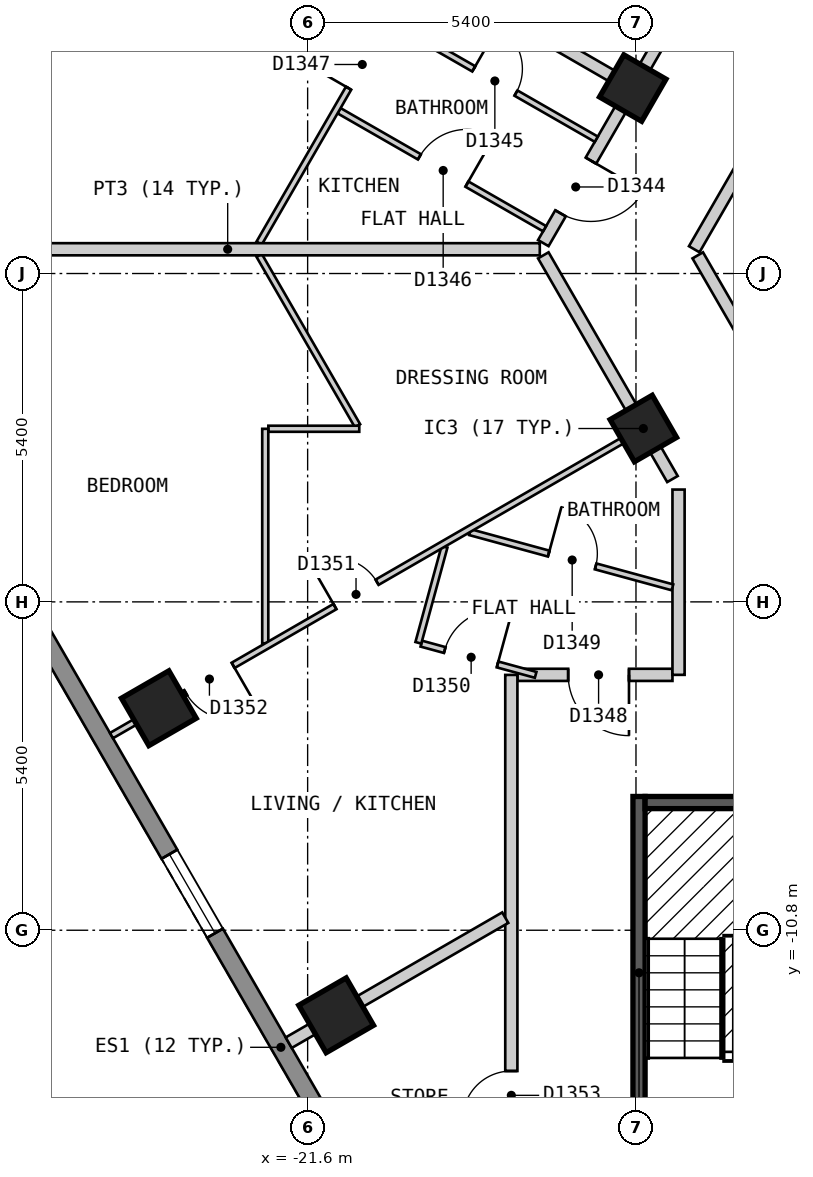
"""IFC4 building model, lengths in metres.
Left out: names, types, materials, properties, quantities, classifications, styles, units other than length and angle.
Written with IfcOpenShell. Run it as: python <this file> out.ifc"""

import sys

from ifc_helpers import new_model, si_unit, direction, frame, frame_2d, origin, origin_2d, place, context, subcontext, project, spatial, polyline, rectangle, outline, extrude, element, fill, save


model = new_model("IFC4")
c1 = context("Model", 3, precision=1e-05, world=origin(), true_north=direction((0.0, 1.0)))
c2 = subcontext(c1, "Body", "Model", "MODEL_VIEW")
j1 = project(units=[si_unit("LENGTHUNIT", "METRE"), si_unit("PLANEANGLEUNIT", "RADIAN")], contexts=[c1])
p1 = place(None, origin())
s1 = spatial("IfcSite", under=j1, at=p1, CompositionType="ELEMENT")
p2 = place(p1, origin())
s2 = spatial("IfcBuilding", under=s1, at=p2, CompositionType="ELEMENT")
p3 = place(p2, frame((0.0, 0.0, 135.6)))
s3 = spatial("IfcBuildingStorey", under=s2, at=p3, CompositionType="ELEMENT", Elevation=135.6)
for number, where, z_axis, x_axis in (
    (1, (-24.047, -7.149, 0.0), (0.0, 0.0, 1.0), (0.5, -0.866, 0.0)),
    (2, (-21.131, -12.199, 0.0), (0.0, 0.0, 1.0), (0.5, -0.866, 0.0)),
):
    element("IfcColumn", number, at=place(p3, frame(where, z_axis=z_axis, x_axis=x_axis)), inside=s3, PredefinedType="COLUMN", context=c2, shape_type="SweptSolid", body=[
        extrude(rectangle(XDim=0.9, YDim=0.9, at=origin_2d()), origin(), (0.0, 0.0, 1.0), 3.0),
    ])
for number, where, z_axis, x_axis in (
    (3, (-16.079, -2.549, 0.0), (0.0, 0.0, 1.0), (0.5, -0.866, 0.0)),
    (4, (-16.253, 3.05, 0.0), (0.0, 0.0, 1.0), (-0.5, -0.866, 0.0)),
):
    element("IfcColumn", number, at=place(p3, frame(where, z_axis=z_axis, x_axis=x_axis)), inside=s3, PredefinedType="COLUMN", context=c2, shape_type="SweptSolid", body=[
        extrude(rectangle(XDim=0.8, YDim=0.8, at=origin_2d()), origin(), (0.0, 0.0, 1.0), 3.0),
    ])
p4 = place(p3, frame((-16.555, 23.025, 0.0), z_axis=(0.0, 0.0, 1.0), x_axis=(-0.500020536353, -0.866013546791, 0.0)))
e5 = element("IfcWall", 5, at=p4, inside=s3, PredefinedType="SOLIDWALL", context=c2, shape_type="SweptSolid", body=[
    extrude(outline(polyline([(0.0, -0.15), (23.325, -0.15), (23.245, 0.15), (0.08, 0.15), (0.0, -0.15)])), origin(), (0.0, 0.0, 1.0), 2.7),
])
p5 = place(p4, frame((2.685, 0.0, 0.15)))
e6 = element("IfcOpeningElement", 6, at=p5, cuts=e5, PredefinedType="OPENING", context=c2, shape_type="SweptSolid", body=[
    extrude(rectangle(XDim=1.5, YDim=2.1, at=frame_2d((0.75, 1.05))), frame((0.0, 0.16, 0.0), z_axis=(0.0, -1.0, 0.0), x_axis=(1.0, 0.0, 0.0)), (0.0, 0.0, 1.0), 0.32),
])
p6 = place(p4, frame((8.171, 0.0, 0.15)))
e7 = element("IfcOpeningElement", 7, at=p6, cuts=e5, PredefinedType="OPENING", context=c2, shape_type="SweptSolid", body=[
    extrude(rectangle(XDim=1.5, YDim=2.1, at=frame_2d((0.75, 1.05))), frame((0.0, 0.16, 0.0), z_axis=(0.0, -1.0, 0.0), x_axis=(1.0, 0.0, 0.0)), (0.0, 0.0, 1.0), 0.32),
])
p7 = place(p4, frame((13.655, 0.0, 0.15)))
e8 = element("IfcOpeningElement", 8, at=p7, cuts=e5, PredefinedType="OPENING", context=c2, shape_type="SweptSolid", body=[
    extrude(rectangle(XDim=1.5, YDim=2.1, at=frame_2d((0.75, 1.05))), frame((0.0, 0.16, 0.0), z_axis=(0.0, -1.0, 0.0), x_axis=(1.0, 0.0, 0.0)), (0.0, 0.0, 1.0), 0.32),
])
p8 = place(p4, frame((19.14, 0.0, 0.15)))
e9 = element("IfcOpeningElement", 9, at=p8, cuts=e5, PredefinedType="OPENING", context=c2, shape_type="SweptSolid", body=[
    extrude(rectangle(XDim=1.5, YDim=2.1, at=frame_2d((0.75, 1.05))), frame((0.0, 0.16, 0.0), z_axis=(0.0, -1.0, 0.0), x_axis=(1.0, 0.0, 0.0)), (0.0, 0.0, 1.0), 0.32),
])
p9 = place(p3, frame((-28.218, -2.025, 0.0), z_axis=(0.0, 0.0, 1.0), x_axis=(0.500017503135, -0.866015298109, 0.0)))
e10 = element("IfcWall", 10, at=p9, inside=s3, PredefinedType="SOLIDWALL", context=c2, shape_type="SweptSolid", body=[
    extrude(outline(polyline([(0.0, -0.15), (24.711, -0.15), (24.631, 0.15), (0.08, 0.15), (0.0, -0.15)])), origin(), (0.0, 0.0, 1.0), 2.7),
])
p10 = place(p9, frame((2.857, 0.0, 0.15)))
e11 = element("IfcOpeningElement", 11, at=p10, cuts=e10, PredefinedType="OPENING", context=c2, shape_type="SweptSolid", body=[
    extrude(rectangle(XDim=1.5, YDim=2.1, at=frame_2d((0.75, 1.05))), frame((0.0, 0.16, 0.0), z_axis=(0.0, -1.0, 0.0), x_axis=(1.0, 0.0, 0.0)), (0.0, 0.0, 1.0), 0.32),
])
p11 = place(p9, frame((8.689, 0.0, 0.15)))
e12 = element("IfcOpeningElement", 12, at=p11, cuts=e10, PredefinedType="OPENING", context=c2, shape_type="SweptSolid", body=[
    extrude(rectangle(XDim=1.5, YDim=2.1, at=frame_2d((0.75, 1.05))), frame((0.0, 0.16, 0.0), z_axis=(0.0, -1.0, 0.0), x_axis=(1.0, 0.0, 0.0)), (0.0, 0.0, 1.0), 0.32),
])
p12 = place(p9, frame((14.52, 0.0, 0.15)))
e13 = element("IfcOpeningElement", 13, at=p12, cuts=e10, PredefinedType="OPENING", context=c2, shape_type="SweptSolid", body=[
    extrude(rectangle(XDim=1.5, YDim=2.1, at=frame_2d((0.75, 1.05))), frame((0.0, 0.16, 0.0), z_axis=(0.0, -1.0, 0.0), x_axis=(1.0, 0.0, 0.0)), (0.0, 0.0, 1.0), 0.32),
])
p13 = place(p9, frame((20.351, 0.0, 0.15)))
e14 = element("IfcOpeningElement", 14, at=p13, cuts=e10, PredefinedType="OPENING", context=c2, shape_type="SweptSolid", body=[
    extrude(rectangle(XDim=1.5, YDim=2.1, at=frame_2d((0.75, 1.05))), frame((0.0, 0.16, 0.0), z_axis=(0.0, -1.0, 0.0), x_axis=(1.0, 0.0, 0.0)), (0.0, 0.0, 1.0), 0.32),
])
p14 = place(p3, frame((-15.184, 0.299, 0.0), z_axis=(0.0, 0.0, 1.0), x_axis=(0.500149577091, -0.865939028186, 0.0)))
e15 = element("IfcWall", 15, at=p14, inside=s3, PredefinedType="PARTITIONING", context=c2, shape_type="SweptSolid", body=[
    extrude(rectangle(XDim=3.463, YDim=0.2, at=frame_2d((1.732, 0.0))), origin(), (0.0, 0.0, 1.0), 2.7),
])
p15 = place(p3, frame((-17.724, 0.299, 0.0), z_axis=(0.0, 0.0, 1.0), x_axis=(0.499923815713, -0.866069384335, 0.0)))
e16 = element("IfcWall", 16, at=p15, inside=s3, PredefinedType="PARTITIONING", context=c2, shape_type="SweptSolid", body=[
    extrude(rectangle(XDim=3.289, YDim=0.2, at=frame_2d((1.644, 0.0))), origin(), (0.0, 0.0, 1.0), 2.7),
])
p16 = place(p3, frame((-16.02, -2.652, 0.0), z_axis=(0.0, 0.0, 1.0), x_axis=(0.499764376199, -0.866161398518, 0.0)))
e17 = element("IfcWall", 17, at=p16, inside=s3, PredefinedType="PARTITIONING", context=c2, shape_type="SweptSolid", body=[
    extrude(rectangle(XDim=0.84, YDim=0.2, at=frame_2d((0.42, 0.0))), origin(), (0.0, 0.0, 1.0), 2.7),
])
p17 = place(p3, frame((-18.149, -6.6, 0.0), z_axis=(0.0, 0.0, 1.0), x_axis=(1.0, 0.0, 0.0)))
e18 = element("IfcWall", 18, at=p17, inside=s3, PredefinedType="PARTITIONING", context=c2, shape_type="SweptSolid", body=[
    extrude(rectangle(XDim=2.549, YDim=0.2, at=frame_2d((1.274, 0.0))), origin(), (0.0, 0.0, 1.0), 2.7),
])
p18 = place(p17, frame((0.834, 0.0, 0.0)))
e19 = element("IfcOpeningElement", 19, at=p18, cuts=e18, PredefinedType="OPENING", context=c2, shape_type="SweptSolid", body=[
    extrude(rectangle(XDim=1.0, YDim=2.1, at=frame_2d((0.5, 1.05))), frame((0.0, 0.11, 0.0), z_axis=(0.0, -1.0, 0.0), x_axis=(1.0, 0.0, 0.0)), (0.0, 0.0, 1.0), 0.22),
])
p19 = place(p3, frame((-15.242, 0.399, 0.0), z_axis=(0.0, 0.0, 1.0), x_axis=(0.499953615651, 0.866052182145, 0.0)))
e20 = element("IfcWall", 20, at=p19, inside=s3, PredefinedType="PARTITIONING", context=c2, shape_type="SweptSolid", body=[
    extrude(rectangle(XDim=8.777, YDim=0.2, at=frame_2d((4.388, 0.0))), origin(), (0.0, 0.0, 1.0), 2.7),
])
p20 = place(p19, frame((3.938, 0.0, 0.0)))
e21 = element("IfcOpeningElement", 21, at=p20, cuts=e20, PredefinedType="OPENING", context=c2, shape_type="SweptSolid", body=[
    extrude(rectangle(XDim=0.9, YDim=2.1, at=frame_2d((0.45, 1.05))), frame((0.0, 0.11, 0.0), z_axis=(0.0, -1.0, 0.0), x_axis=(1.0, 0.0, 0.0)), (0.0, 0.0, 1.0), 0.22),
])
p21 = place(p3, frame((-17.724, 0.5, 0.0), z_axis=(0.0, 0.0, 1.0), x_axis=(0.499994801602, 0.86602840506, 0.0)))
e22 = element("IfcWall", 22, at=p21, inside=s3, PredefinedType="PARTITIONING", context=c2, shape_type="SweptSolid", body=[
    extrude(rectangle(XDim=16.916, YDim=0.2, at=frame_2d((8.458, 0.0))), origin(), (0.0, 0.0, 1.0), 2.7),
])
p22 = place(p21, frame((10.672, 0.0, 0.0)))
e23 = element("IfcOpeningElement", 23, at=p22, cuts=e22, PredefinedType="OPENING", context=c2, shape_type="SweptSolid", body=[
    extrude(rectangle(XDim=1.0, YDim=2.1, at=frame_2d((0.5, 1.05))), frame((0.0, 0.11, 0.0), z_axis=(0.0, -1.0, 0.0), x_axis=(1.0, 0.0, 0.0)), (0.0, 0.0, 1.0), 0.22),
])
p23 = place(p21, frame((5.187, 0.0, 0.0)))
e24 = element("IfcOpeningElement", 24, at=p23, cuts=e22, PredefinedType="OPENING", context=c2, shape_type="SweptSolid", body=[
    extrude(rectangle(XDim=1.0, YDim=2.1, at=frame_2d((0.5, 1.05))), frame((0.0, 0.11, 0.0), z_axis=(0.0, -1.0, 0.0), x_axis=(1.0, 0.0, 0.0)), (0.0, 0.0, 1.0), 0.22),
])
p24 = place(p21, frame((0.566, 0.0, 0.0)))
e25 = element("IfcOpeningElement", 25, at=p24, cuts=e22, PredefinedType="OPENING", context=c2, shape_type="SweptSolid", body=[
    extrude(rectangle(XDim=1.0, YDim=2.1, at=frame_2d((0.5, 1.05))), frame((0.0, 0.11, 0.0), z_axis=(0.0, -1.0, 0.0), x_axis=(1.0, 0.0, 0.0)), (0.0, 0.0, 1.0), 0.22),
])
p25 = place(p3, frame((-15.5, -6.6, 0.0), z_axis=(0.0, 0.0, 1.0), x_axis=(0.0, 1.0, 0.0)))
e26 = element("IfcWall", 26, at=p25, inside=s3, PredefinedType="PARTITIONING", context=c2, shape_type="SweptSolid", body=[
    extrude(rectangle(XDim=3.047, YDim=0.2, at=frame_2d((1.523, 0.0))), origin(), (0.0, 0.0, 1.0), 2.7),
])
p26 = place(p3, frame((-18.25, -16.4, 0.0), z_axis=(0.0, 0.0, 1.0), x_axis=(0.0, 1.0, 0.0)))
e27 = element("IfcWall", 27, at=p26, inside=s3, PredefinedType="PARTITIONING", context=c2, shape_type="SweptSolid", body=[
    extrude(rectangle(XDim=9.799, YDim=0.2, at=frame_2d((4.899, 0.0))), origin(), (0.0, 0.0, 1.0), 2.7),
])
p27 = place(p26, frame((2.485, 0.0, 0.0)))
e28 = element("IfcOpeningElement", 28, at=p27, cuts=e27, PredefinedType="OPENING", context=c2, shape_type="SweptSolid", body=[
    extrude(rectangle(XDim=0.8, YDim=2.1, at=frame_2d((0.4, 1.05))), frame((0.0, 0.11, 0.0), z_axis=(0.0, -1.0, 0.0), x_axis=(1.0, 0.0, 0.0)), (0.0, 0.0, 1.0), 0.22),
])
p28 = place(p3, frame((-22.398, 0.299, 0.0), z_axis=(0.0, 0.0, 1.0), x_axis=(0.50004249738, -0.86600086652, 0.0)))
e29 = element("IfcWall", 29, at=p28, inside=s3, PredefinedType="PARTITIONING", context=c2, shape_type="SweptSolid", body=[
    extrude(rectangle(XDim=3.236, YDim=0.1, at=frame_2d((1.618, 0.0))), origin(), (0.0, 0.0, 1.0), 2.7),
])
p29 = place(p3, frame((-18.931, -4.253, 0.0), z_axis=(0.0, 0.0, 1.0), x_axis=(0.96479645258, -0.262997728296, 0.0)))
e30 = element("IfcWall", 30, at=p29, inside=s3, PredefinedType="PARTITIONING", context=c2, shape_type="SweptSolid", body=[
    extrude(rectangle(XDim=3.452, YDim=0.1, at=frame_2d((1.726, 0.0))), origin(), (0.0, 0.0, 1.0), 2.7),
])
p30 = place(p29, frame((1.343, 0.0, 0.0)))
e31 = element("IfcOpeningElement", 31, at=p30, cuts=e30, PredefinedType="OPENING", context=c2, shape_type="SweptSolid", body=[
    extrude(rectangle(XDim=0.8, YDim=2.1, at=frame_2d((0.4, 1.05))), frame((0.0, 0.06, 0.0), z_axis=(0.0, -1.0, 0.0), x_axis=(1.0, 0.0, 0.0)), (0.0, 0.0, 1.0), 0.12),
])
p31 = place(p3, frame((-19.73, -6.087, 0.0), z_axis=(0.0, 0.0, 1.0), x_axis=(0.964700186442, -0.263350622325, 0.0)))
e32 = element("IfcWall", 32, at=p31, inside=s3, PredefinedType="PARTITIONING", context=c2, shape_type="SweptSolid", body=[
    extrude(rectangle(XDim=1.949, YDim=0.1, at=frame_2d((0.974, 0.0))), origin(), (0.0, 0.0, 1.0), 2.7),
])
p32 = place(p31, frame((0.399, 0.0, 0.0)))
e33 = element("IfcOpeningElement", 33, at=p32, cuts=e32, PredefinedType="OPENING", context=c2, shape_type="SweptSolid", body=[
    extrude(rectangle(XDim=0.9, YDim=2.1, at=frame_2d((0.45, 1.05))), frame((0.0, 0.06, 0.0), z_axis=(0.0, -1.0, 0.0), x_axis=(1.0, 0.0, 0.0)), (0.0, 0.0, 1.0), 0.12),
])
p33 = place(p3, frame((-20.233, 4.149, 0.0), z_axis=(0.0, 0.0, 1.0), x_axis=(0.867293167797, -0.497797711016, 0.0)))
e34 = element("IfcWall", 34, at=p33, inside=s3, PredefinedType="PARTITIONING", context=c2, shape_type="SweptSolid", body=[
    extrude(rectangle(XDim=3.897, YDim=0.1, at=frame_2d((1.948, 0.0))), origin(), (0.0, 0.0, 1.0), 2.7),
])
p34 = place(p33, frame((1.574, 0.0, 0.0)))
e35 = element("IfcOpeningElement", 35, at=p34, cuts=e34, PredefinedType="OPENING", context=c2, shape_type="SweptSolid", body=[
    extrude(rectangle(XDim=0.8, YDim=2.1, at=frame_2d((0.4, 1.05))), frame((0.0, 0.06, 0.0), z_axis=(0.0, -1.0, 0.0), x_axis=(1.0, 0.0, 0.0)), (0.0, 0.0, 1.0), 0.12),
])
p35 = place(p3, frame((-21.083, 2.677, 0.0), z_axis=(0.0, 0.0, 1.0), x_axis=(0.867308690764, -0.497770664991, 0.0)))
e36 = element("IfcWall", 36, at=p35, inside=s3, PredefinedType="PARTITIONING", context=c2, shape_type="SweptSolid", body=[
    extrude(rectangle(XDim=3.897, YDim=0.1, at=frame_2d((1.949, 0.0))), origin(), (0.0, 0.0, 1.0), 2.7),
])
p36 = place(p35, frame((1.524, 0.0, 0.0)))
e37 = element("IfcOpeningElement", 37, at=p36, cuts=e36, PredefinedType="OPENING", context=c2, shape_type="SweptSolid", body=[
    extrude(rectangle(XDim=0.9, YDim=2.1, at=frame_2d((0.45, 1.05))), frame((0.0, 0.06, 0.0), z_axis=(0.0, -1.0, 0.0), x_axis=(1.0, 0.0, 0.0)), (0.0, 0.0, 1.0), 0.12),
])
p37 = place(p3, frame((-22.246, -2.553, 0.0), z_axis=(0.0, 0.0, 1.0), x_axis=(1.0, 0.0, 0.0)))
e38 = element("IfcWall", 38, at=p37, inside=s3, PredefinedType="PARTITIONING", context=c2, shape_type="SweptSolid", body=[
    extrude(rectangle(XDim=1.495, YDim=0.1, at=frame_2d((0.748, 0.0))), origin(), (0.0, 0.0, 1.0), 2.7),
])
p38 = place(p3, frame((-22.398, 0.499, 0.0), z_axis=(0.0, 0.0, 1.0), x_axis=(0.499984806807, 0.866034175401, 0.0)))
e39 = element("IfcWall", 39, at=p38, inside=s3, PredefinedType="PARTITIONING", context=c2, shape_type="SweptSolid", body=[
    extrude(rectangle(XDim=5.182, YDim=0.1, at=frame_2d((2.591, 0.0))), origin(), (0.0, 0.0, 1.0), 2.7),
])
p39 = place(p38, frame((2.943, 0.0, 0.0)))
e40 = element("IfcOpeningElement", 40, at=p39, cuts=e39, PredefinedType="OPENING", context=c2, shape_type="SweptSolid", body=[
    extrude(rectangle(XDim=0.9, YDim=2.1, at=frame_2d((0.45, 1.05))), frame((0.0, 0.06, 0.0), z_axis=(0.0, -1.0, 0.0), x_axis=(1.0, 0.0, 0.0)), (0.0, 0.0, 1.0), 0.12),
])
p40 = place(p3, frame((-19.779, -6.073, 0.0), z_axis=(0.0, 0.0, 1.0), x_axis=(0.262700832967, 0.964877335395, 0.0)))
e41 = element("IfcWall", 41, at=p40, inside=s3, PredefinedType="PARTITIONING", context=c2, shape_type="SweptSolid", body=[
    extrude(rectangle(XDim=1.636, YDim=0.1, at=frame_2d((0.818, 0.0))), origin(), (0.0, 0.0, 1.0), 2.7),
])
p41 = place(p3, frame((-22.297, -6.081, 0.0), z_axis=(0.0, 0.0, 1.0), x_axis=(0.0, 1.0, 0.0)))
e42 = element("IfcWall", 42, at=p41, inside=s3, PredefinedType="PARTITIONING", context=c2, shape_type="SweptSolid", body=[
    extrude(rectangle(XDim=3.527, YDim=0.1, at=frame_2d((1.764, 0.0))), origin(), (0.0, 0.0, 1.0), 2.7),
])
p42 = place(p3, frame((-24.826, -7.599, 0.0), z_axis=(0.0, 0.0, 1.0), x_axis=(0.866020686789, 0.500008169986, 0.0)))
e43 = element("IfcWall", 43, at=p42, inside=s3, PredefinedType="PARTITIONING", context=c2, shape_type="SweptSolid", body=[
    extrude(rectangle(XDim=10.01, YDim=0.1, at=frame_2d((5.005, 0.0))), origin(), (0.0, 0.0, 1.0), 2.7),
])
p43 = place(p42, frame((4.244, 0.0, 0.0)))
e44 = element("IfcOpeningElement", 44, at=p43, cuts=e43, PredefinedType="OPENING", context=c2, shape_type="SweptSolid", body=[
    extrude(rectangle(XDim=0.8, YDim=2.1, at=frame_2d((0.4, 1.05))), frame((0.0, 0.06, 0.0), z_axis=(0.0, -1.0, 0.0), x_axis=(1.0, 0.0, 0.0)), (0.0, 0.0, 1.0), 0.12),
])
p44 = place(p42, frame((1.41, 0.0, 0.0)))
e45 = element("IfcOpeningElement", 45, at=p44, cuts=e43, PredefinedType="OPENING", context=c2, shape_type="SweptSolid", body=[
    extrude(rectangle(XDim=0.9, YDim=2.1, at=frame_2d((0.45, 1.05))), frame((0.0, 0.06, 0.0), z_axis=(0.0, -1.0, 0.0), x_axis=(1.0, 0.0, 0.0)), (0.0, 0.0, 1.0), 0.12),
])
p45 = place(p3, frame((-24.999, 8.1, 0.0), z_axis=(0.0, 0.0, 1.0), x_axis=(0.866016855193, -0.500014806302, 0.0)))
e46 = element("IfcWall", 46, at=p45, inside=s3, PredefinedType="PARTITIONING", context=c2, shape_type="SweptSolid", body=[
    extrude(rectangle(XDim=10.0, YDim=0.2, at=frame_2d((5.0, 0.0))), origin(), (0.0, 0.0, 1.0), 2.7),
])
p46 = place(p3, frame((-28.048, 0.399, 0.0), z_axis=(0.0, 0.0, 1.0), x_axis=(1.0, 0.0, 0.0)))
e47 = element("IfcWall", 47, at=p46, inside=s3, PredefinedType="PARTITIONING", context=c2, shape_type="SweptSolid", body=[
    extrude(rectangle(XDim=10.266, YDim=0.2, at=frame_2d((5.133, 0.0))), origin(), (0.0, 0.0, 1.0), 2.7),
])
p47 = place(p3, frame((-21.911, -12.649, 0.0), z_axis=(0.0, 0.0, 1.0), x_axis=(0.866016499285, 0.500015422728, 0.0)))
e48 = element("IfcWall", 48, at=p47, inside=s3, PredefinedType="PARTITIONING", context=c2, shape_type="SweptSolid", body=[
    extrude(rectangle(XDim=4.112, YDim=0.2, at=frame_2d((2.056, 0.0))), origin(), (0.0, 0.0, 1.0), 2.7),
])
p48 = place(p3, frame((-16.15, -14.4, 0.0), z_axis=(0.0, 0.0, 1.0), x_axis=(0.0, 1.0, 0.0)))
e49 = element("IfcWall", 49, at=p48, inside=s3, PredefinedType="SOLIDWALL", context=c2, shape_type="SweptSolid", body=[
    extrude(rectangle(XDim=5.8, YDim=0.2, at=frame_2d((2.9, 0.0))), origin(), (0.0, 0.0, 1.0), 2.7),
])
p49 = place(p3, frame((-16.05, -8.7, 0.0), z_axis=(0.0, 0.0, 1.0), x_axis=(1.0, 0.0, 0.0)))
e50 = element("IfcWall", 50, at=p49, inside=s3, PredefinedType="SOLIDWALL", context=c2, shape_type="SweptSolid", body=[
    extrude(rectangle(XDim=2.75, YDim=0.2, at=frame_2d((1.375, 0.0))), origin(), (0.0, 0.0, 1.0), 2.7),
])
p50 = place(p11, origin())
e51 = element("IfcWindow", 51, at=p50, inside=s3, PartitioningType="SINGLE_PANEL", PredefinedType="WINDOW", context=c2, shape_type="SweptSolid", body=[
    extrude(rectangle(XDim=1.5, YDim=2.1, at=frame_2d((0.75, 1.05))), frame((0.0, 0.03, 0.0), z_axis=(0.0, -1.0, 0.0), x_axis=(1.0, 0.0, 0.0)), (0.0, 0.0, 1.0), 0.06),
])
fill(e12, e51)
p51 = place(p24, origin())
e52 = element("IfcDoor", 52, at=p51, inside=s3, OperationType="SINGLE_SWING_RIGHT", PredefinedType="DOOR", context=c2, shape_type="SweptSolid", body=[
    extrude(rectangle(XDim=1.0, YDim=2.1, at=frame_2d((0.5, 1.05))), frame((0.0, 0.025, 0.0), z_axis=(0.0, -1.0, 0.0), x_axis=(1.0, 0.0, 0.0)), (0.0, 0.0, 1.0), 0.05),
])
fill(e25, e52)
p52 = place(p34, origin())
e53 = element("IfcDoor", 53, at=p52, inside=s3, OperationType="SINGLE_SWING_LEFT", PredefinedType="DOOR", context=c2, shape_type="SweptSolid", body=[
    extrude(rectangle(XDim=0.8, YDim=2.1, at=frame_2d((0.4, 1.05))), frame((0.0, 0.025, 0.0), z_axis=(0.0, -1.0, 0.0), x_axis=(1.0, 0.0, 0.0)), (0.0, 0.0, 1.0), 0.05),
])
fill(e35, e53)
p53 = place(p36, origin())
e54 = element("IfcDoor", 54, at=p53, inside=s3, OperationType="SINGLE_SWING_RIGHT", PredefinedType="DOOR", context=c2, shape_type="SweptSolid", body=[
    extrude(rectangle(XDim=0.9, YDim=2.1, at=frame_2d((0.45, 1.05))), frame((0.0, 0.025, 0.0), z_axis=(0.0, -1.0, 0.0), x_axis=(1.0, 0.0, 0.0)), (0.0, 0.0, 1.0), 0.05),
])
fill(e37, e54)
p54 = place(p39, origin())
e55 = element("IfcDoor", 55, at=p54, inside=s3, OperationType="SINGLE_SWING_LEFT", PredefinedType="DOOR", context=c2, shape_type="SweptSolid", body=[
    extrude(rectangle(XDim=0.9, YDim=2.1, at=frame_2d((0.45, 1.05))), frame((0.0, 0.025, 0.0), z_axis=(0.0, -1.0, 0.0), x_axis=(1.0, 0.0, 0.0)), (0.0, 0.0, 1.0), 0.05),
])
fill(e40, e55)
p55 = place(p18, origin())
e56 = element("IfcDoor", 56, at=p55, inside=s3, OperationType="SINGLE_SWING_RIGHT", PredefinedType="DOOR", context=c2, shape_type="SweptSolid", body=[
    extrude(rectangle(XDim=1.0, YDim=2.1, at=frame_2d((0.5, 1.05))), frame((0.0, 0.025, 0.0), z_axis=(0.0, -1.0, 0.0), x_axis=(1.0, 0.0, 0.0)), (0.0, 0.0, 1.0), 0.05),
])
fill(e19, e56)
p56 = place(p30, origin())
e57 = element("IfcDoor", 57, at=p56, inside=s3, OperationType="SINGLE_SWING_LEFT", PredefinedType="DOOR", context=c2, shape_type="SweptSolid", body=[
    extrude(rectangle(XDim=0.8, YDim=2.1, at=frame_2d((0.4, 1.05))), frame((0.0, 0.025, 0.0), z_axis=(0.0, -1.0, 0.0), x_axis=(1.0, 0.0, 0.0)), (0.0, 0.0, 1.0), 0.05),
])
fill(e31, e57)
p57 = place(p32, origin())
e58 = element("IfcDoor", 58, at=p57, inside=s3, OperationType="SINGLE_SWING_RIGHT", PredefinedType="DOOR", context=c2, shape_type="SweptSolid", body=[
    extrude(rectangle(XDim=0.9, YDim=2.1, at=frame_2d((0.45, 1.05))), frame((0.0, 0.025, 0.0), z_axis=(0.0, -1.0, 0.0), x_axis=(1.0, 0.0, 0.0)), (0.0, 0.0, 1.0), 0.05),
])
fill(e33, e58)
p58 = place(p43, origin())
e59 = element("IfcDoor", 59, at=p58, inside=s3, OperationType="SINGLE_SWING_LEFT", PredefinedType="DOOR", context=c2, shape_type="SweptSolid", body=[
    extrude(rectangle(XDim=0.8, YDim=2.1, at=frame_2d((0.4, 1.05))), frame((0.0, 0.025, 0.0), z_axis=(0.0, -1.0, 0.0), x_axis=(1.0, 0.0, 0.0)), (0.0, 0.0, 1.0), 0.05),
])
fill(e44, e59)
p59 = place(p44, origin())
e60 = element("IfcDoor", 60, at=p59, inside=s3, OperationType="SINGLE_SWING_RIGHT", PredefinedType="DOOR", context=c2, shape_type="SweptSolid", body=[
    extrude(rectangle(XDim=0.9, YDim=2.1, at=frame_2d((0.45, 1.05))), frame((0.0, 0.025, 0.0), z_axis=(0.0, -1.0, 0.0), x_axis=(1.0, 0.0, 0.0)), (0.0, 0.0, 1.0), 0.05),
])
fill(e45, e60)
p60 = place(p27, origin())
e61 = element("IfcDoor", 61, at=p60, inside=s3, OperationType="SINGLE_SWING_LEFT", PredefinedType="DOOR", context=c2, shape_type="SweptSolid", body=[
    extrude(rectangle(XDim=0.8, YDim=2.1, at=frame_2d((0.4, 1.05))), frame((0.0, 0.025, 0.0), z_axis=(0.0, -1.0, 0.0), x_axis=(1.0, 0.0, 0.0)), (0.0, 0.0, 1.0), 0.05),
])
fill(e28, e61)
save(model, sys.argv[1])
